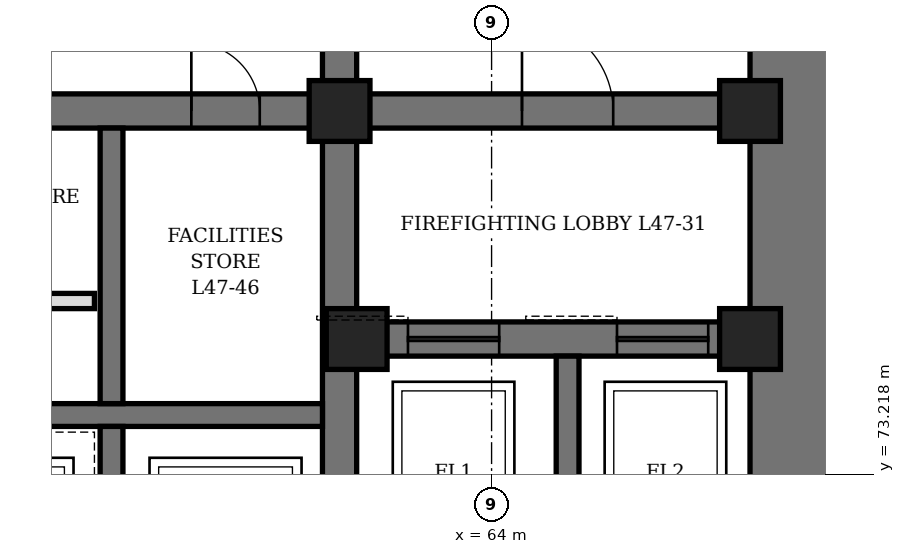
"""IFC4 building model, lengths in metres.
Left out: names, types, materials, properties, quantities, classifications, styles, units other than length and angle.
Written with IfcOpenShell. Run it as: python <this file> out.ifc"""

import sys

from ifc_helpers import new_model, si_unit, direction, frame, frame_2d, origin, origin_2d, place, context, subcontext, project, spatial, rectangle, hollow_rectangle, extrude, element, fill, save


model = new_model("IFC4")
c1 = context("Model", 3, precision=1e-05, world=origin(), true_north=direction((0.0, 1.0)))
c2 = subcontext(c1, "Body", "Model", "MODEL_VIEW")
j1 = project(units=[si_unit("LENGTHUNIT", "METRE"), si_unit("PLANEANGLEUNIT", "RADIAN")], contexts=[c1])
p1 = place(None, origin())
s1 = spatial("IfcSite", under=j1, at=p1, CompositionType="ELEMENT")
p2 = place(p1, origin())
s2 = spatial("IfcBuilding", under=s1, at=p2, CompositionType="ELEMENT")
p3 = place(p2, frame((0.0, 0.0, 210.7)))
s3 = spatial("IfcBuildingStorey", under=s2, at=p3, CompositionType="ELEMENT", Elevation=210.7)
p4 = place(p3, frame((68.0, 70.4, 0.0), z_axis=(0.0, 0.0, 1.0), x_axis=(0.0, 1.0, 0.0)))
e1 = element("IfcWall", 1, at=p4, inside=s3, PredefinedType="SHEAR", context=c2, shape_type="SweptSolid", body=[
    extrude(rectangle(XDim=19.2, YDim=1.2, at=frame_2d((9.6, 0.0))), origin(), (0.0, 0.0, 1.0), 4.2),
])
p5 = place(p4, frame((8.6, 0.0, 0.0)))
e2 = element("IfcOpeningElement", 2, at=p5, cuts=e1, PredefinedType="OPENING", context=c2, shape_type="SweptSolid", body=[
    extrude(rectangle(XDim=2.0, YDim=2.4, at=frame_2d((1.0, 1.2))), frame((0.0, 0.61, 0.0), z_axis=(0.0, -1.0, 0.0), x_axis=(1.0, 0.0, 0.0)), (0.0, 0.0, 1.0), 1.22),
])
p6 = place(p3, frame((62.0, 71.6, 0.0), z_axis=(0.0, 0.0, 1.0), x_axis=(0.0, 1.0, 0.0)))
e3 = element("IfcWall", 3, at=p6, inside=s3, PredefinedType="SHEAR", context=c2, shape_type="SweptSolid", body=[
    extrude(rectangle(XDim=16.8, YDim=0.45, at=frame_2d((8.4, 0.0))), origin(), (0.0, 0.0, 1.0), 4.2),
])
p7 = place(p6, frame((7.5, 0.0, 0.0)))
e4 = element("IfcOpeningElement", 4, at=p7, cuts=e3, PredefinedType="OPENING", context=c2, shape_type="SweptSolid", body=[
    extrude(rectangle(XDim=1.8, YDim=2.4, at=frame_2d((0.9, 1.2))), frame((0.0, 0.235, 0.0), z_axis=(0.0, -1.0, 0.0), x_axis=(1.0, 0.0, 0.0)), (0.0, 0.0, 1.0), 0.47),
])
p8 = place(p3, frame((62.225, 75.0, 0.0), z_axis=(0.0, 0.0, 1.0), x_axis=(1.0, 0.0, 0.0)))
e5 = element("IfcWall", 5, at=p8, inside=s3, PredefinedType="SHEAR", context=c2, shape_type="SweptSolid", body=[
    extrude(rectangle(XDim=5.175, YDim=0.45, at=frame_2d((2.587, 0.0))), origin(), (0.0, 0.0, 1.0), 4.2),
])
p9 = place(p8, frame((0.675, 0.0, 0.0)))
e6 = element("IfcOpeningElement", 6, at=p9, cuts=e5, PredefinedType="OPENING", context=c2, shape_type="SweptSolid", body=[
    extrude(rectangle(XDim=1.2, YDim=2.2, at=frame_2d((0.6, 1.1))), frame((0.0, 0.235, 0.0), z_axis=(0.0, -1.0, 0.0), x_axis=(1.0, 0.0, 0.0)), (0.0, 0.0, 1.0), 0.47),
])
p10 = place(p8, frame((3.425, 0.0, 0.0)))
e7 = element("IfcOpeningElement", 7, at=p10, cuts=e5, PredefinedType="OPENING", context=c2, shape_type="SweptSolid", body=[
    extrude(rectangle(XDim=1.2, YDim=2.2, at=frame_2d((0.6, 1.1))), frame((0.0, 0.235, 0.0), z_axis=(0.0, -1.0, 0.0), x_axis=(1.0, 0.0, 0.0)), (0.0, 0.0, 1.0), 0.47),
])
p11 = place(p3, frame((62.225, 78.0, 0.0), z_axis=(0.0, 0.0, 1.0), x_axis=(1.0, 0.0, 0.0)))
e8 = element("IfcWall", 8, at=p11, inside=s3, PredefinedType="SHEAR", context=c2, shape_type="SweptSolid", body=[
    extrude(rectangle(XDim=5.175, YDim=0.45, at=frame_2d((2.587, 0.0))), origin(), (0.0, 0.0, 1.0), 4.2),
])
p12 = place(p11, frame((2.175, 0.0, 0.0)))
e9 = element("IfcOpeningElement", 9, at=p12, cuts=e8, PredefinedType="OPENING", context=c2, shape_type="SweptSolid", body=[
    extrude(rectangle(XDim=1.2, YDim=2.1, at=frame_2d((0.6, 1.05))), frame((0.0, 0.235, 0.0), z_axis=(0.0, -1.0, 0.0), x_axis=(1.0, 0.0, 0.0)), (0.0, 0.0, 1.0), 0.47),
])
p13 = place(p3, frame((50.225, 78.0, 0.0), z_axis=(0.0, 0.0, 1.0), x_axis=(1.0, 0.0, 0.0)))
e10 = element("IfcWall", 10, at=p13, inside=s3, PredefinedType="SHEAR", context=c2, shape_type="SweptSolid", body=[
    extrude(rectangle(XDim=11.55, YDim=0.45, at=frame_2d((5.775, 0.0))), origin(), (0.0, 0.0, 1.0), 4.2),
])
p14 = place(p13, frame((0.825, 0.0, 0.0)))
e11 = element("IfcOpeningElement", 11, at=p14, cuts=e10, PredefinedType="OPENING", context=c2, shape_type="SweptSolid", body=[
    extrude(rectangle(XDim=0.9, YDim=2.1, at=frame_2d((0.45, 1.05))), frame((0.0, 0.235, 0.0), z_axis=(0.0, -1.0, 0.0), x_axis=(1.0, 0.0, 0.0)), (0.0, 0.0, 1.0), 0.47),
])
p15 = place(p13, frame((3.825, 0.0, 0.0)))
e12 = element("IfcOpeningElement", 12, at=p15, cuts=e10, PredefinedType="OPENING", context=c2, shape_type="SweptSolid", body=[
    extrude(rectangle(XDim=0.9, YDim=2.1, at=frame_2d((0.45, 1.05))), frame((0.0, 0.235, 0.0), z_axis=(0.0, -1.0, 0.0), x_axis=(1.0, 0.0, 0.0)), (0.0, 0.0, 1.0), 0.47),
])
p16 = place(p13, frame((6.825, 0.0, 0.0)))
e13 = element("IfcOpeningElement", 13, at=p16, cuts=e10, PredefinedType="OPENING", context=c2, shape_type="SweptSolid", body=[
    extrude(rectangle(XDim=0.9, YDim=2.1, at=frame_2d((0.45, 1.05))), frame((0.0, 0.235, 0.0), z_axis=(0.0, -1.0, 0.0), x_axis=(1.0, 0.0, 0.0)), (0.0, 0.0, 1.0), 0.47),
])
p17 = place(p13, frame((9.825, 0.0, 0.0)))
e14 = element("IfcOpeningElement", 14, at=p17, cuts=e10, PredefinedType="OPENING", context=c2, shape_type="SweptSolid", body=[
    extrude(rectangle(XDim=0.9, YDim=2.1, at=frame_2d((0.45, 1.05))), frame((0.0, 0.235, 0.0), z_axis=(0.0, -1.0, 0.0), x_axis=(1.0, 0.0, 0.0)), (0.0, 0.0, 1.0), 0.47),
])
p18 = place(p3, frame((50.225, 74.0, 0.0), z_axis=(0.0, 0.0, 1.0), x_axis=(1.0, 0.0, 0.0)))
e15 = element("IfcWall", 15, at=p18, inside=s3, PredefinedType="SHEAR", context=c2, shape_type="SweptSolid", body=[
    extrude(rectangle(XDim=11.55, YDim=0.3, at=frame_2d((5.775, 0.0))), origin(), (0.0, 0.0, 1.0), 4.2),
])
p19 = place(p3, frame((59.0, 71.6, 0.0), z_axis=(0.0, 0.0, 1.0), x_axis=(0.0, 1.0, 0.0)))
e16 = element("IfcWall", 16, at=p19, inside=s3, PredefinedType="SHEAR", context=c2, shape_type="SweptSolid", body=[
    extrude(rectangle(XDim=2.25, YDim=0.3, at=frame_2d((1.125, 0.0))), origin(), (0.0, 0.0, 1.0), 4.2),
])
p20 = place(p3, frame((59.0, 74.15, 0.0), z_axis=(0.0, 0.0, 1.0), x_axis=(0.0, 1.0, 0.0)))
e17 = element("IfcWall", 17, at=p20, inside=s3, PredefinedType="SHEAR", context=c2, shape_type="SweptSolid", body=[
    extrude(rectangle(XDim=3.625, YDim=0.3, at=frame_2d((1.812, 0.0))), origin(), (0.0, 0.0, 1.0), 4.2),
])
p21 = place(p3, frame((65.0, 71.6, 0.0), z_axis=(0.0, 0.0, 1.0), x_axis=(0.0, 1.0, 0.0)))
e18 = element("IfcWall", 18, at=p21, inside=s3, PredefinedType="SHEAR", context=c2, shape_type="SweptSolid", body=[
    extrude(rectangle(XDim=3.175, YDim=0.3, at=frame_2d((1.587, 0.0))), origin(), (0.0, 0.0, 1.0), 4.2),
])
for number, where, z_axis, x_axis in (
    (19, (62.0, 78.0, 0.0), (0.0, 0.0, 1.0), (1.0, 0.0, 0.0)),
    (20, (62.225, 75.0, 0.0), (0.0, 0.0, 1.0), (1.0, 0.0, 0.0)),
    (21, (67.4, 75.0, 0.0), (0.0, 0.0, 1.0), (1.0, 0.0, 0.0)),
    (22, (67.4, 78.0, 0.0), (0.0, 0.0, 1.0), (1.0, 0.0, 0.0)),
):
    element("IfcColumn", number, at=place(p3, frame(where, z_axis=z_axis, x_axis=x_axis)), inside=s3, PredefinedType="COLUMN", context=c2, shape_type="SweptSolid", body=[
        extrude(hollow_rectangle(XDim=0.8, YDim=0.8, WallThickness=0.1, at=origin_2d()), origin(), (0.0, 0.0, 1.0), 4.2),
    ])
p22 = place(p3, frame((56.225, 75.5, 0.0), z_axis=(0.0, 0.0, 1.0), x_axis=(1.0, 0.0, 0.0)))
e23 = element("IfcWall", 23, at=p22, inside=s3, PredefinedType="PARTITIONING", context=c2, shape_type="SweptSolid", body=[
    extrude(rectangle(XDim=2.55, YDim=0.2, at=frame_2d((1.275, 0.0))), origin(), (0.0, 0.0, 1.0), 4.04),
])
p23 = place(p22, frame((0.825, 0.0, 0.0)))
e24 = element("IfcOpeningElement", 24, at=p23, cuts=e23, PredefinedType="OPENING", context=c2, shape_type="SweptSolid", body=[
    extrude(rectangle(XDim=0.9, YDim=2.1, at=frame_2d((0.45, 1.05))), frame((0.0, 0.11, 0.0), z_axis=(0.0, -1.0, 0.0), x_axis=(1.0, 0.0, 0.0)), (0.0, 0.0, 1.0), 0.22),
])
p24 = place(p17, origin())
e25 = element("IfcDoor", 25, at=p24, inside=s3, OperationType="SINGLE_SWING_LEFT", PredefinedType="DOOR", context=c2, shape_type="SweptSolid", body=[
    extrude(rectangle(XDim=0.9, YDim=2.1, at=frame_2d((0.45, 1.05))), frame((0.0, 0.225, 0.0), z_axis=(0.0, -1.0, 0.0), x_axis=(1.0, 0.0, 0.0)), (0.0, 0.0, 1.0), 0.449),
])
fill(e14, e25)
p25 = place(p12, origin())
e26 = element("IfcDoor", 26, at=p25, inside=s3, OperationType="SINGLE_SWING_RIGHT", PredefinedType="DOOR", context=c2, shape_type="SweptSolid", body=[
    extrude(rectangle(XDim=1.2, YDim=2.1, at=frame_2d((0.6, 1.05))), frame((0.0, 0.225, 0.0), z_axis=(0.0, -1.0, 0.0), x_axis=(1.0, 0.0, 0.0)), (0.0, 0.0, 1.0), 0.449),
])
fill(e9, e26)
p26 = place(p9, origin())
e27 = element("IfcDoor", 27, at=p26, inside=s3, OperationType="SLIDING_TO_LEFT", PredefinedType="DOOR", context=c2, shape_type="SweptSolid", body=[
    extrude(rectangle(XDim=1.2, YDim=2.2, at=frame_2d((0.6, 1.1))), frame((0.0, 0.225, 0.0), z_axis=(0.0, -1.0, 0.0), x_axis=(1.0, 0.0, 0.0)), (0.0, 0.0, 1.0), 0.449),
])
fill(e6, e27)
p27 = place(p10, origin())
e28 = element("IfcDoor", 28, at=p27, inside=s3, OperationType="SLIDING_TO_LEFT", PredefinedType="DOOR", context=c2, shape_type="SweptSolid", body=[
    extrude(rectangle(XDim=1.2, YDim=2.2, at=frame_2d((0.6, 1.1))), frame((0.0, 0.225, 0.0), z_axis=(0.0, -1.0, 0.0), x_axis=(1.0, 0.0, 0.0)), (0.0, 0.0, 1.0), 0.449),
])
fill(e7, e28)
save(model, sys.argv[1])
